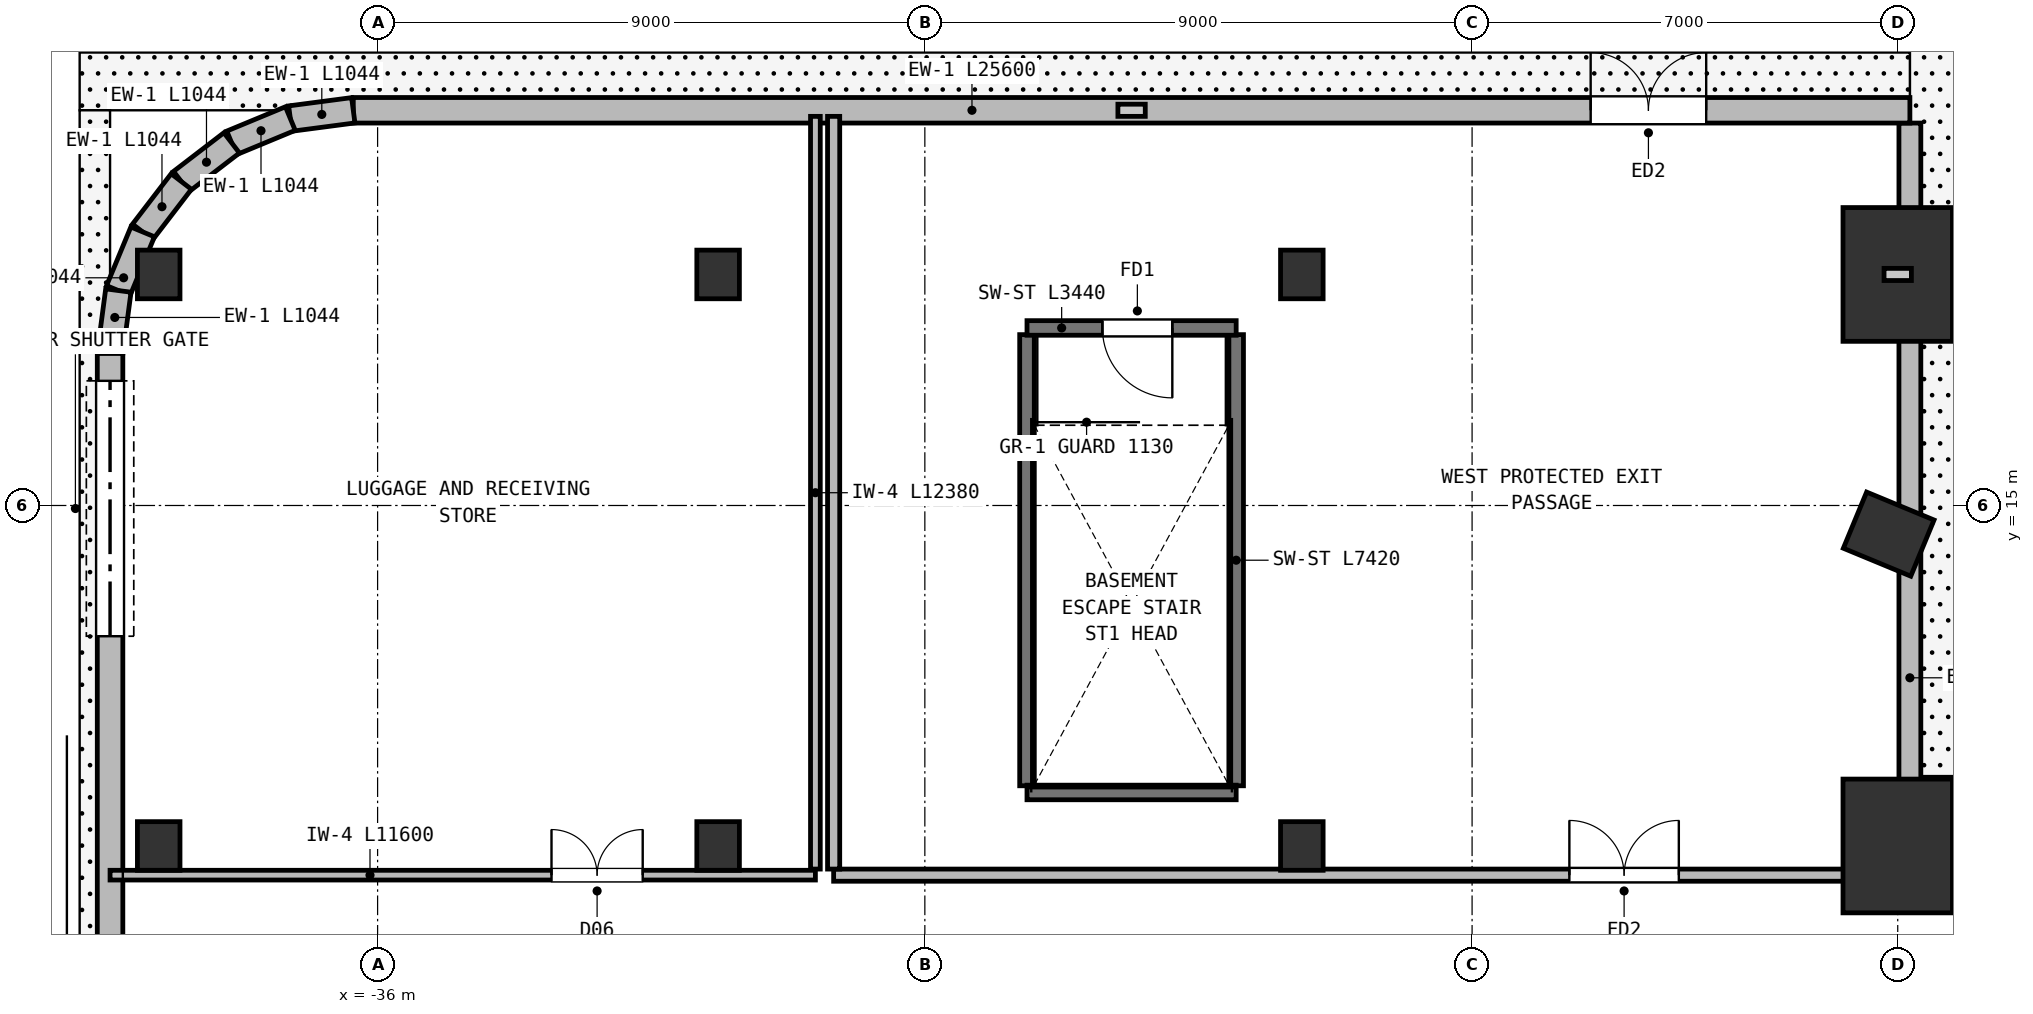
"""IFC4 building model, lengths in metres.
Left out: names, types, materials, properties, quantities, classifications, styles, units other than length and angle.
Written with IfcOpenShell. Run it as: python <this file> out.ifc"""

import sys

from ifc_helpers import new_model, si_unit, direction, frame, frame_2d, origin, origin_2d, place, context, subcontext, project, spatial, rectangle, extrude, element, fill, save


model = new_model("IFC4")
c1 = context("Model", 3, precision=1e-05, world=origin(), true_north=direction((0.0, 1.0)))
c2 = subcontext(c1, "Body", "Model", "MODEL_VIEW")
j1 = project(units=[si_unit("LENGTHUNIT", "METRE"), si_unit("PLANEANGLEUNIT", "RADIAN")], contexts=[c1])
p1 = place(None, origin())
s1 = spatial("IfcSite", under=j1, at=p1, CompositionType="ELEMENT")
p2 = place(p1, origin())
s2 = spatial("IfcBuilding", under=s1, at=p2, CompositionType="ELEMENT")
p3 = place(p2, origin())
s3 = spatial("IfcBuildingStorey", under=s2, at=p3, CompositionType="ELEMENT", Elevation=0.0)
p4 = place(p3, frame((-11.148, 14.529, 0.0), z_axis=(0.0, 0.0, 1.0), x_axis=(0.382683432365, 0.923879532511, 0.0)))
e1 = element("IfcColumn", 1, at=p4, inside=s3, PredefinedType="COLUMN", context=c2, shape_type="SweptSolid", body=[
    extrude(rectangle(XDim=1.0, YDim=1.2, at=origin_2d()), origin(), (0.0, 0.0, 1.0), 6.0),
])
for number, where, z_axis, x_axis in (
    (2, (-39.6, 9.4, 0.0), (0.0, 0.0, 1.0), (1.0, 0.0, 0.0)),
    (3, (-39.6, 18.8, 0.0), (0.0, 0.0, 1.0), (1.0, 0.0, 0.0)),
    (4, (-30.4, 9.4, 0.0), (0.0, 0.0, 1.0), (1.0, 0.0, 0.0)),
    (5, (-30.4, 18.8, 0.0), (0.0, 0.0, 1.0), (1.0, 0.0, 0.0)),
    (6, (-20.8, 9.4, 0.0), (0.0, 0.0, 1.0), (1.0, 0.0, 0.0)),
    (7, (-20.8, 18.8, 0.0), (0.0, 0.0, 1.0), (1.0, 0.0, 0.0)),
):
    element("IfcColumn", number, at=place(p3, frame(where, z_axis=z_axis, x_axis=x_axis)), inside=s3, PredefinedType="COLUMN", context=c2, shape_type="SweptSolid", body=[
        extrude(rectangle(XDim=0.7, YDim=0.8, at=origin_2d()), origin(), (0.0, 0.0, 1.0), 6.0),
    ])
for number, where, z_axis, x_axis in (
    (8, (-11.0, 9.4, 0.0), (0.0, 0.0, 1.0), (1.0, 0.0, 0.0)),
    (9, (-11.0, 18.8, 0.0), (0.0, 0.0, 1.0), (1.0, 0.0, 0.0)),
):
    element("IfcColumn", number, at=place(p3, frame(where, z_axis=z_axis, x_axis=x_axis)), inside=s3, PredefinedType="COLUMN", context=c2, shape_type="SweptSolid", body=[
        extrude(rectangle(XDim=1.8, YDim=2.2, at=origin_2d()), origin(), (0.0, 0.0, 1.0), 6.0),
    ])
p5 = place(p3, frame((-10.6, 10.32, 0.0), z_axis=(0.0, 0.0, 1.0), x_axis=(1.0, 0.0, 0.0)))
e10 = element("IfcWall", 10, at=p5, inside=s3, PredefinedType="SOLIDWALL", context=c2, shape_type="SweptSolid", body=[
    extrude(rectangle(XDim=4.9, YDim=0.42, at=frame_2d((2.45, 0.0))), origin(), (0.0, 0.0, 1.0), 5.72),
])
p6 = place(p5, frame((1.5, 0.0, 0.0)))
e11 = element("IfcOpeningElement", 11, at=p6, cuts=e10, PredefinedType="OPENING", context=c2, shape_type="SweptSolid", body=[
    extrude(rectangle(XDim=1.9, YDim=2.35, at=frame_2d((0.95, 1.175))), frame((0.0, 0.22, 0.0), z_axis=(0.0, -1.0, 0.0), x_axis=(1.0, 0.0, 0.0)), (0.0, 0.0, 1.0), 0.44),
])
p7 = place(p3, frame((-10.8, 10.32, 0.0), z_axis=(0.0, 0.0, 1.0), x_axis=(0.0, 1.0, 0.0)))
e12 = element("IfcWall", 12, at=p7, inside=s3, PredefinedType="SOLIDWALL", context=c2, shape_type="SweptSolid", body=[
    extrude(rectangle(XDim=10.97, YDim=0.36, at=frame_2d((5.485, 0.0))), origin(), (0.0, 0.0, 1.0), 5.1),
])
p8 = place(p3, frame((-36.4, 21.5, 0.0), z_axis=(0.0, 0.0, 1.0), x_axis=(1.0, 0.0, 0.0)))
e13 = element("IfcWall", 13, at=p8, inside=s3, PredefinedType="SOLIDWALL", context=c2, shape_type="SweptSolid", body=[
    extrude(rectangle(XDim=25.6, YDim=0.42, at=frame_2d((12.8, 0.0))), origin(), (0.0, 0.0, 1.0), 5.72),
])
p9 = place(p8, frame((20.35, 0.0, 0.0)))
e14 = element("IfcOpeningElement", 14, at=p9, cuts=e13, PredefinedType="OPENING", context=c2, shape_type="SweptSolid", body=[
    extrude(rectangle(XDim=1.9, YDim=2.35, at=frame_2d((0.95, 1.175))), frame((0.0, 0.22, 0.0), z_axis=(0.0, -1.0, 0.0), x_axis=(1.0, 0.0, 0.0)), (0.0, 0.0, 1.0), 0.44),
])
p10 = place(p3, frame((-37.435, 21.364, 0.0), z_axis=(0.0, 0.0, 1.0), x_axis=(0.991455091231, 0.130448465198, 0.0)))
e15 = element("IfcWall", 15, at=p10, inside=s3, PredefinedType="SOLIDWALL", context=c2, shape_type="SweptSolid", body=[
    extrude(rectangle(XDim=1.044, YDim=0.42, at=frame_2d((0.522, 0.0))), origin(), (0.0, 0.0, 1.0), 5.72),
])
p11 = place(p3, frame((-38.4, 20.964, 0.0), z_axis=(0.0, 0.0, 1.0), x_axis=(0.923842970528, 0.382771688877, 0.0)))
e16 = element("IfcWall", 16, at=p11, inside=s3, PredefinedType="SOLIDWALL", context=c2, shape_type="SweptSolid", body=[
    extrude(rectangle(XDim=1.044, YDim=0.42, at=frame_2d((0.522, 0.0))), origin(), (0.0, 0.0, 1.0), 5.72),
])
p12 = place(p3, frame((-39.229, 20.328, 0.0), z_axis=(0.0, 0.0, 1.0), x_axis=(0.793388088797, 0.608716141198, 0.0)))
e17 = element("IfcWall", 17, at=p12, inside=s3, PredefinedType="SOLIDWALL", context=c2, shape_type="SweptSolid", body=[
    extrude(rectangle(XDim=1.044, YDim=0.42, at=frame_2d((0.522, 0.0))), origin(), (0.0, 0.0, 1.0), 5.72),
])
p13 = place(p3, frame((-39.864, 19.5, 0.0), z_axis=(0.0, 0.0, 1.0), x_axis=(0.608681879412, 0.793414374508, 0.0)))
e18 = element("IfcWall", 18, at=p13, inside=s3, PredefinedType="SOLIDWALL", context=c2, shape_type="SweptSolid", body=[
    extrude(rectangle(XDim=1.044, YDim=0.42, at=frame_2d((0.522, 0.0))), origin(), (0.0, 0.0, 1.0), 5.72),
])
p14 = place(p3, frame((-40.264, 18.535, 0.0), z_axis=(0.0, 0.0, 1.0), x_axis=(0.382771688877, 0.923842970528, 0.0)))
e19 = element("IfcWall", 19, at=p14, inside=s3, PredefinedType="SOLIDWALL", context=c2, shape_type="SweptSolid", body=[
    extrude(rectangle(XDim=1.044, YDim=0.42, at=frame_2d((0.522, 0.0))), origin(), (0.0, 0.0, 1.0), 5.72),
])
p15 = place(p3, frame((-40.4, 17.5, 0.0), z_axis=(0.0, 0.0, 1.0), x_axis=(0.130448465198, 0.991455091231, 0.0)))
e20 = element("IfcWall", 20, at=p15, inside=s3, PredefinedType="SOLIDWALL", context=c2, shape_type="SweptSolid", body=[
    extrude(rectangle(XDim=1.044, YDim=0.42, at=frame_2d((0.522, 0.0))), origin(), (0.0, 0.0, 1.0), 5.72),
])
p16 = place(p3, frame((-40.4, -17.5, 0.0), z_axis=(0.0, 0.0, 1.0), x_axis=(0.0, 1.0, 0.0)))
e21 = element("IfcWall", 21, at=p16, inside=s3, PredefinedType="SOLIDWALL", context=c2, shape_type="SweptSolid", body=[
    extrude(rectangle(XDim=35.0, YDim=0.42, at=frame_2d((17.5, 0.0))), origin(), (0.0, 0.0, 1.0), 5.1),
])
p17 = place(p16, frame((12.7, 0.0, 0.0)))
e22 = element("IfcOpeningElement", 22, at=p17, cuts=e21, PredefinedType="OPENING", context=c2, shape_type="SweptSolid", body=[
    extrude(rectangle(XDim=2.4, YDim=2.65, at=frame_2d((1.2, 1.325))), frame((0.0, 0.22, 0.0), z_axis=(0.0, -1.0, 0.0), x_axis=(1.0, 0.0, 0.0)), (0.0, 0.0, 1.0), 0.44),
])
p18 = place(p16, frame((19.9, 0.0, 0.0)))
e23 = element("IfcOpeningElement", 23, at=p18, cuts=e21, PredefinedType="OPENING", context=c2, shape_type="SweptSolid", body=[
    extrude(rectangle(XDim=2.4, YDim=2.65, at=frame_2d((1.2, 1.325))), frame((0.0, 0.22, 0.0), z_axis=(0.0, -1.0, 0.0), x_axis=(1.0, 0.0, 0.0)), (0.0, 0.0, 1.0), 0.44),
])
p19 = place(p16, frame((30.35, 0.0, 0.0)))
e24 = element("IfcOpeningElement", 24, at=p19, cuts=e21, PredefinedType="OPENING", context=c2, shape_type="SweptSolid", body=[
    extrude(rectangle(XDim=4.2, YDim=3.2, at=frame_2d((2.1, 1.6))), frame((0.0, 0.22, 0.0), z_axis=(0.0, -1.0, 0.0), x_axis=(1.0, 0.0, 0.0)), (0.0, 0.0, 1.0), 0.44),
])
for number, where, z_axis, x_axis in (
    (25, (-25.32, 10.39, 0.0), (0.0, 0.0, 1.0), (0.0, 1.0, 0.0)),
    (26, (-21.88, 10.39, 0.0), (0.0, 0.0, 1.0), (0.0, 1.0, 0.0)),
):
    element("IfcWall", number, at=place(p3, frame(where, z_axis=z_axis, x_axis=x_axis)), inside=s3, PredefinedType="SHEAR", context=c2, shape_type="SweptSolid", body=[
        extrude(rectangle(XDim=7.42, YDim=0.24, at=frame_2d((3.71, 0.0))), origin(), (0.0, 0.0, 1.0), 5.72),
    ])
p20 = place(p3, frame((-25.32, 10.28, 0.0), z_axis=(0.0, 0.0, 1.0), x_axis=(1.0, 0.0, 0.0)))
e27 = element("IfcWall", 27, at=p20, inside=s3, PredefinedType="SHEAR", context=c2, shape_type="SweptSolid", body=[
    extrude(rectangle(XDim=3.44, YDim=0.24, at=frame_2d((1.72, 0.0))), origin(), (0.0, 0.0, 1.0), 5.72),
])
p21 = place(p3, frame((-21.88, 17.92, 0.0), z_axis=(0.0, 0.0, 1.0), x_axis=(-1.0, 0.0, 0.0)))
e28 = element("IfcWall", 28, at=p21, inside=s3, PredefinedType="SHEAR", context=c2, shape_type="SweptSolid", body=[
    extrude(rectangle(XDim=3.44, YDim=0.24, at=frame_2d((1.72, 0.0))), origin(), (0.0, 0.0, 1.0), 5.72),
])
p22 = place(p21, frame((1.05, 0.0, 0.0)))
e29 = element("IfcOpeningElement", 29, at=p22, cuts=e28, PredefinedType="OPENING", context=c2, shape_type="SweptSolid", body=[
    extrude(rectangle(XDim=1.15, YDim=2.15, at=frame_2d((0.575, 1.075))), frame((0.0, 0.13, 0.0), z_axis=(0.0, -1.0, 0.0), x_axis=(1.0, 0.0, 0.0)), (0.0, 0.0, 1.0), 0.26),
])
p23 = place(p3, frame((-28.5, 8.92, 0.0), z_axis=(0.0, 0.0, 1.0), x_axis=(1.0, 0.0, 0.0)))
e30 = element("IfcWall", 30, at=p23, inside=s3, PredefinedType="PARTITIONING", context=c2, shape_type="SweptSolid", body=[
    extrude(rectangle(XDim=17.45, YDim=0.2, at=frame_2d((8.725, 0.0))), origin(), (0.0, 0.0, 1.0), 5.72),
])
p24 = place(p23, frame((12.1, 0.0, 0.0)))
e31 = element("IfcOpeningElement", 31, at=p24, cuts=e30, PredefinedType="OPENING", context=c2, shape_type="SweptSolid", body=[
    extrude(rectangle(XDim=1.8, YDim=2.2, at=frame_2d((0.9, 1.1))), frame((0.0, 0.11, 0.0), z_axis=(0.0, -1.0, 0.0), x_axis=(1.0, 0.0, 0.0)), (0.0, 0.0, 1.0), 0.22),
])
p25 = place(p3, frame((-28.5, 21.4, 0.0), z_axis=(0.0, 0.0, 1.0), x_axis=(0.0, -1.0, 0.0)))
e32 = element("IfcWall", 32, at=p25, inside=s3, PredefinedType="PARTITIONING", context=c2, shape_type="SweptSolid", body=[
    extrude(rectangle(XDim=12.38, YDim=0.2, at=frame_2d((6.19, 0.0))), origin(), (0.0, 0.0, 1.0), 5.72),
])
p26 = place(p3, frame((-40.4, 8.92, 0.0), z_axis=(0.0, 0.0, 1.0), x_axis=(1.0, 0.0, 0.0)))
e33 = element("IfcWall", 33, at=p26, inside=s3, PredefinedType="PARTITIONING", context=c2, shape_type="SweptSolid", body=[
    extrude(rectangle(XDim=11.6, YDim=0.16, at=frame_2d((5.8, 0.0))), origin(), (0.0, 0.0, 1.0), 5.72),
])
p27 = place(p26, frame((7.26, 0.0, 0.0)))
e34 = element("IfcOpeningElement", 34, at=p27, cuts=e33, PredefinedType="OPENING", context=c2, shape_type="SweptSolid", body=[
    extrude(rectangle(XDim=1.5, YDim=2.2, at=frame_2d((0.75, 1.1))), frame((0.0, 0.09, 0.0), z_axis=(0.0, -1.0, 0.0), x_axis=(1.0, 0.0, 0.0)), (0.0, 0.0, 1.0), 0.18),
])
p28 = place(p3, frame((-28.8, 9.02, 0.0), z_axis=(0.0, 0.0, 1.0), x_axis=(0.0, 1.0, 0.0)))
e35 = element("IfcWall", 35, at=p28, inside=s3, PredefinedType="PARTITIONING", context=c2, shape_type="SweptSolid", body=[
    extrude(rectangle(XDim=12.38, YDim=0.16, at=frame_2d((6.19, 0.0))), origin(), (0.0, 0.0, 1.0), 5.72),
])
p29 = place(p3, frame((-10.65, 10.25, 0.0), z_axis=(0.0, 0.0, 1.0), x_axis=(0.0, -1.0, 0.0)))
e36 = element("IfcWall", 36, at=p29, inside=s3, PredefinedType="PARTITIONING", context=c2, shape_type="SweptSolid", body=[
    extrude(rectangle(XDim=1.37, YDim=0.2, at=frame_2d((0.685, 0.0))), origin(), (0.0, 0.0, 1.0), 5.72),
])
p30 = place(p19, origin())
e37 = element("IfcDoor", 37, at=p30, inside=s3, OperationType="ROLLINGUP", PredefinedType="GATE", context=c2, shape_type="SweptSolid", body=[
    extrude(rectangle(XDim=4.2, YDim=3.2, at=frame_2d((2.1, 1.6))), frame((0.0, 0.025, 0.0), z_axis=(0.0, -1.0, 0.0), x_axis=(1.0, 0.0, 0.0)), (0.0, 0.0, 1.0), 0.05),
])
fill(e24, e37)
p31 = place(p9, origin())
e38 = element("IfcDoor", 38, at=p31, inside=s3, OperationType="DOUBLE_DOOR_SINGLE_SWING", PredefinedType="DOOR", context=c2, shape_type="SweptSolid", body=[
    extrude(rectangle(XDim=1.9, YDim=2.35, at=frame_2d((0.95, 1.175))), frame((0.0, 0.025, 0.0), z_axis=(0.0, -1.0, 0.0), x_axis=(1.0, 0.0, 0.0)), (0.0, 0.0, 1.0), 0.05),
])
fill(e14, e38)
p32 = place(p22, origin())
e39 = element("IfcDoor", 39, at=p32, inside=s3, OperationType="SINGLE_SWING_LEFT", PredefinedType="DOOR", context=c2, shape_type="SweptSolid", body=[
    extrude(rectangle(XDim=1.15, YDim=2.15, at=frame_2d((0.575, 1.075))), frame((0.0, 0.025, 0.0), z_axis=(0.0, -1.0, 0.0), x_axis=(1.0, 0.0, 0.0)), (0.0, 0.0, 1.0), 0.05),
])
fill(e29, e39)
p33 = place(p24, origin())
e40 = element("IfcDoor", 40, at=p33, inside=s3, OperationType="DOUBLE_DOOR_SINGLE_SWING", PredefinedType="DOOR", context=c2, shape_type="SweptSolid", body=[
    extrude(rectangle(XDim=1.8, YDim=2.2, at=frame_2d((0.9, 1.1))), frame((0.0, 0.025, 0.0), z_axis=(0.0, -1.0, 0.0), x_axis=(1.0, 0.0, 0.0)), (0.0, 0.0, 1.0), 0.05),
])
fill(e31, e40)
p34 = place(p27, origin())
e41 = element("IfcDoor", 41, at=p34, inside=s3, OperationType="DOUBLE_DOOR_SINGLE_SWING", PredefinedType="DOOR", context=c2, shape_type="SweptSolid", body=[
    extrude(rectangle(XDim=1.5, YDim=2.2, at=frame_2d((0.75, 1.1))), frame((0.0, 0.025, 0.0), z_axis=(0.0, -1.0, 0.0), x_axis=(1.0, 0.0, 0.0)), (0.0, 0.0, 1.0), 0.05),
])
fill(e34, e41)
save(model, sys.argv[1])
